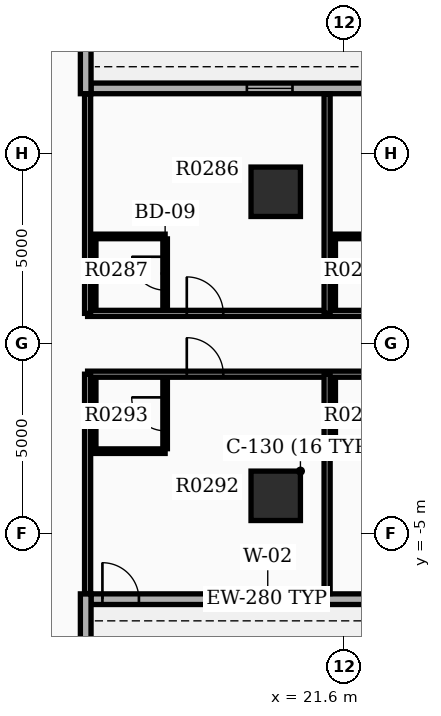
"""IFC4 building model, lengths in metres.
Left out: names, types, materials, properties, quantities, classifications, styles, units other than length and angle.
Written with IfcOpenShell. Run it as: python <this file> out.ifc"""

import sys

from ifc_helpers import new_model, si_unit, direction, frame, frame_2d, origin, origin_2d, place, context, subcontext, project, spatial, rectangle, extrude, element, fill, save


model = new_model("IFC4")
c1 = context("Model", 3, precision=1e-05, world=origin(), true_north=direction((0.0, 1.0)))
c2 = subcontext(c1, "Body", "Model", "MODEL_VIEW")
j1 = project(units=[si_unit("LENGTHUNIT", "METRE"), si_unit("PLANEANGLEUNIT", "RADIAN")], contexts=[c1])
p1 = place(None, origin())
s1 = spatial("IfcSite", under=j1, at=p1, CompositionType="ELEMENT")
p2 = place(p1, origin())
s2 = spatial("IfcBuilding", under=s1, at=p2, CompositionType="ELEMENT")
p3 = place(p2, frame((0.0, 0.0, 23.7)))
s3 = spatial("IfcBuildingStorey", under=s2, at=p3, CompositionType="ELEMENT", Elevation=23.7)
for number, where, z_axis, x_axis in (
    (1, (19.8, -4.0, 0.0), (0.0, 0.0, 1.0), (1.0, 0.0, 0.0)),
    (2, (19.8, 4.0, 0.0), (0.0, 0.0, 1.0), (1.0, 0.0, 0.0)),
):
    element("IfcColumn", number, at=place(p3, frame(where, z_axis=z_axis, x_axis=x_axis)), inside=s3, PredefinedType="COLUMN", context=c2, shape_type="SweptSolid", body=[
        extrude(rectangle(XDim=1.3, YDim=1.3, at=origin_2d()), origin(), (0.0, 0.0, 1.0), 3.9),
    ])
p4 = place(p3, frame((14.94, -6.72, 0.0), z_axis=(0.0, 0.0, 1.0), x_axis=(1.0, 0.0, 0.0)))
e3 = element("IfcWall", 3, at=p4, inside=s3, PredefinedType="STANDARD", context=c2, shape_type="SweptSolid", body=[
    extrude(rectangle(XDim=20.1, YDim=0.28, at=frame_2d((10.05, 0.0))), origin(), (0.0, 0.0, 1.0), 2.91),
])
p5 = place(p4, frame((4.05, 0.0, 0.8)))
e4 = element("IfcOpeningElement", 4, at=p5, cuts=e3, PredefinedType="OPENING", context=c2, shape_type="SweptSolid", body=[
    extrude(rectangle(XDim=1.2, YDim=1.6, at=frame_2d((0.6, 0.8))), frame((0.0, 0.15, 0.0), z_axis=(0.0, -1.0, 0.0), x_axis=(1.0, 0.0, 0.0)), (0.0, 0.0, 1.0), 0.3),
])
p6 = place(p4, frame((7.25, 0.0, 0.8)))
e5 = element("IfcOpeningElement", 5, at=p6, cuts=e3, PredefinedType="OPENING", context=c2, shape_type="SweptSolid", body=[
    extrude(rectangle(XDim=1.2, YDim=1.6, at=frame_2d((0.6, 0.8))), frame((0.0, 0.15, 0.0), z_axis=(0.0, -1.0, 0.0), x_axis=(1.0, 0.0, 0.0)), (0.0, 0.0, 1.0), 0.3),
])
p7 = place(p4, frame((10.45, 0.0, 0.8)))
e6 = element("IfcOpeningElement", 6, at=p7, cuts=e3, PredefinedType="OPENING", context=c2, shape_type="SweptSolid", body=[
    extrude(rectangle(XDim=1.2, YDim=1.6, at=frame_2d((0.6, 0.8))), frame((0.0, 0.15, 0.0), z_axis=(0.0, -1.0, 0.0), x_axis=(1.0, 0.0, 0.0)), (0.0, 0.0, 1.0), 0.3),
])
p8 = place(p4, frame((0.3, 0.0, 0.0)))
e7 = element("IfcOpeningElement", 7, at=p8, cuts=e3, PredefinedType="OPENING", context=c2, shape_type="SweptSolid", body=[
    extrude(rectangle(XDim=0.96, YDim=2.1, at=frame_2d((0.48, 1.05))), frame((0.0, 0.15, 0.0), z_axis=(0.0, -1.0, 0.0), x_axis=(1.0, 0.0, 0.0)), (0.0, 0.0, 1.0), 0.3),
])
p9 = place(p3, frame((35.04, 6.72, 0.0), z_axis=(0.0, 0.0, 1.0), x_axis=(-1.0, 0.0, 0.0)))
e8 = element("IfcWall", 8, at=p9, inside=s3, PredefinedType="STANDARD", context=c2, shape_type="SweptSolid", body=[
    extrude(rectangle(XDim=20.1, YDim=0.28, at=frame_2d((10.05, 0.0))), origin(), (0.0, 0.0, 1.0), 2.91),
])
p10 = place(p9, frame((4.05, 0.0, 0.8)))
e9 = element("IfcOpeningElement", 9, at=p10, cuts=e8, PredefinedType="OPENING", context=c2, shape_type="SweptSolid", body=[
    extrude(rectangle(XDim=1.2, YDim=1.6, at=frame_2d((0.6, 0.8))), frame((0.0, 0.15, 0.0), z_axis=(0.0, -1.0, 0.0), x_axis=(1.0, 0.0, 0.0)), (0.0, 0.0, 1.0), 0.3),
])
p11 = place(p9, frame((7.5, 0.0, 0.8)))
e10 = element("IfcOpeningElement", 10, at=p11, cuts=e8, PredefinedType="OPENING", context=c2, shape_type="SweptSolid", body=[
    extrude(rectangle(XDim=1.2, YDim=1.6, at=frame_2d((0.6, 0.8))), frame((0.0, 0.15, 0.0), z_axis=(0.0, -1.0, 0.0), x_axis=(1.0, 0.0, 0.0)), (0.0, 0.0, 1.0), 0.3),
])
p12 = place(p9, frame((10.7, 0.0, 0.8)))
e11 = element("IfcOpeningElement", 11, at=p12, cuts=e8, PredefinedType="OPENING", context=c2, shape_type="SweptSolid", body=[
    extrude(rectangle(XDim=1.2, YDim=1.6, at=frame_2d((0.6, 0.8))), frame((0.0, 0.15, 0.0), z_axis=(0.0, -1.0, 0.0), x_axis=(1.0, 0.0, 0.0)), (0.0, 0.0, 1.0), 0.3),
])
p13 = place(p9, frame((0.3, 0.0, 0.0)))
e12 = element("IfcOpeningElement", 12, at=p13, cuts=e8, PredefinedType="OPENING", context=c2, shape_type="SweptSolid", body=[
    extrude(rectangle(XDim=0.96, YDim=2.1, at=frame_2d((0.48, 1.05))), frame((0.0, 0.15, 0.0), z_axis=(0.0, -1.0, 0.0), x_axis=(1.0, 0.0, 0.0)), (0.0, 0.0, 1.0), 0.3),
])
p14 = place(p9, frame((14.799, 0.0, 0.85)))
e13 = element("IfcOpeningElement", 13, at=p14, cuts=e8, PredefinedType="OPENING", context=c2, shape_type="SweptSolid", body=[
    extrude(rectangle(XDim=1.2, YDim=1.6, at=frame_2d((0.6, 0.8))), frame((0.0, 0.15, 0.0), z_axis=(0.0, -1.0, 0.0), x_axis=(1.0, 0.0, 0.0)), (0.0, 0.0, 1.0), 0.3),
])
for number, where, z_axis, x_axis in (
    (14, (14.8, 6.58, 0.0), (0.0, 0.0, 1.0), (0.0, 1.0, 0.0)),
    (15, (14.8, -6.58, 0.0), (0.0, 0.0, 1.0), (0.0, -1.0, 0.0)),
):
    element("IfcWall", number, at=place(p3, frame(where, z_axis=z_axis, x_axis=x_axis)), inside=s3, PredefinedType="STANDARD", context=c2, shape_type="SweptSolid", body=[
        extrude(rectangle(XDim=6.86, YDim=0.28, at=frame_2d((3.43, 0.0))), origin(), (0.0, 0.0, 1.0), 2.91),
    ])
p15 = place(p3, frame((14.85, 0.8, 0.0), z_axis=(0.0, 0.0, 1.0), x_axis=(1.0, 0.0, 0.0)))
e16 = element("IfcWall", 16, at=p15, inside=s3, PredefinedType="PARTITIONING", context=c2, shape_type="SweptSolid", body=[
    extrude(rectangle(XDim=20.182, YDim=0.16, at=frame_2d((10.091, 0.0))), origin(), (0.0, 0.0, 1.0), 2.9),
])
p16 = place(p15, frame((2.61, 0.0, 0.0)))
e17 = element("IfcOpeningElement", 17, at=p16, cuts=e16, PredefinedType="OPENING", context=c2, shape_type="SweptSolid", body=[
    extrude(rectangle(XDim=0.96, YDim=2.15, at=frame_2d((0.48, 1.075))), frame((0.0, 0.09, 0.0), z_axis=(0.0, -1.0, 0.0), x_axis=(1.0, 0.0, 0.0)), (0.0, 0.0, 1.0), 0.18),
])
p17 = place(p15, frame((8.994, 0.0, 0.0)))
e18 = element("IfcOpeningElement", 18, at=p17, cuts=e16, PredefinedType="OPENING", context=c2, shape_type="SweptSolid", body=[
    extrude(rectangle(XDim=0.96, YDim=2.15, at=frame_2d((0.48, 1.075))), frame((0.0, 0.09, 0.0), z_axis=(0.0, -1.0, 0.0), x_axis=(1.0, 0.0, 0.0)), (0.0, 0.0, 1.0), 0.18),
])
p18 = place(p15, frame((18.93, 0.0, 0.0)))
e19 = element("IfcOpeningElement", 19, at=p18, cuts=e16, PredefinedType="OPENING", context=c2, shape_type="SweptSolid", body=[
    extrude(rectangle(XDim=0.96, YDim=2.15, at=frame_2d((0.48, 1.075))), frame((0.0, 0.09, 0.0), z_axis=(0.0, -1.0, 0.0), x_axis=(1.0, 0.0, 0.0)), (0.0, 0.0, 1.0), 0.18),
])
for number, where, z_axis, x_axis in (
    (20, (14.85, 0.8, 0.0), (0.0, 0.0, 1.0), (0.0, 1.0, 0.0)),
    (21, (21.152, 0.8, 0.0), (0.0, 0.0, 1.0), (0.0, 1.0, 0.0)),
):
    element("IfcWall", number, at=place(p3, frame(where, z_axis=z_axis, x_axis=x_axis)), inside=s3, PredefinedType="PARTITIONING", context=c2, shape_type="SweptSolid", body=[
        extrude(rectangle(XDim=5.772, YDim=0.16, at=frame_2d((2.886, 0.0))), origin(), (0.0, 0.0, 1.0), 2.9),
    ])
p19 = place(p3, frame((16.89, 0.94, 0.0), z_axis=(0.0, 0.0, 1.0), x_axis=(0.0, 1.0, 0.0)))
e22 = element("IfcWall", 22, at=p19, inside=s3, PredefinedType="PARTITIONING", context=c2, shape_type="SweptSolid", body=[
    extrude(rectangle(XDim=1.82, YDim=0.12, at=frame_2d((0.91, 0.0))), origin(), (0.0, 0.0, 1.0), 2.9),
])
p20 = place(p19, frame((0.47, 0.0, 0.0)))
e23 = element("IfcOpeningElement", 23, at=p20, cuts=e22, PredefinedType="OPENING", context=c2, shape_type="SweptSolid", body=[
    extrude(rectangle(XDim=0.88, YDim=2.1, at=frame_2d((0.44, 1.05))), frame((0.0, 0.07, 0.0), z_axis=(0.0, -1.0, 0.0), x_axis=(1.0, 0.0, 0.0)), (0.0, 0.0, 1.0), 0.14),
])
p21 = place(p3, frame((15.01, 0.94, 0.0), z_axis=(0.0, 0.0, 1.0), x_axis=(0.0, 1.0, 0.0)))
e24 = element("IfcWall", 24, at=p21, inside=s3, PredefinedType="PARTITIONING", context=c2, shape_type="SweptSolid", body=[
    extrude(rectangle(XDim=1.82, YDim=0.12, at=frame_2d((0.91, 0.0))), origin(), (0.0, 0.0, 1.0), 2.9),
])
p22 = place(p3, frame((15.01, 2.825, 0.0), z_axis=(0.0, 0.0, 1.0), x_axis=(1.0, 0.0, 0.0)))
e25 = element("IfcWall", 25, at=p22, inside=s3, PredefinedType="PARTITIONING", context=c2, shape_type="SweptSolid", body=[
    extrude(rectangle(XDim=1.88, YDim=0.12, at=frame_2d((0.94, 0.0))), origin(), (0.0, 0.0, 1.0), 2.9),
])
p23 = place(p3, frame((21.312, 0.94, 0.0), z_axis=(0.0, 0.0, 1.0), x_axis=(0.0, 1.0, 0.0)))
e26 = element("IfcWall", 26, at=p23, inside=s3, PredefinedType="PARTITIONING", context=c2, shape_type="SweptSolid", body=[
    extrude(rectangle(XDim=1.82, YDim=0.12, at=frame_2d((0.91, 0.0))), origin(), (0.0, 0.0, 1.0), 2.9),
])
p24 = place(p3, frame((21.312, 2.825, 0.0), z_axis=(0.0, 0.0, 1.0), x_axis=(1.0, 0.0, 0.0)))
e27 = element("IfcWall", 27, at=p24, inside=s3, PredefinedType="PARTITIONING", context=c2, shape_type="SweptSolid", body=[
    extrude(rectangle(XDim=1.88, YDim=0.12, at=frame_2d((0.94, 0.0))), origin(), (0.0, 0.0, 1.0), 2.9),
])
p25 = place(p3, frame((14.85, -0.8, 0.0), z_axis=(0.0, 0.0, 1.0), x_axis=(1.0, 0.0, 0.0)))
e28 = element("IfcWall", 28, at=p25, inside=s3, PredefinedType="PARTITIONING", context=c2, shape_type="SweptSolid", body=[
    extrude(rectangle(XDim=20.182, YDim=0.16, at=frame_2d((10.091, 0.0))), origin(), (0.0, 0.0, 1.0), 2.9),
])
p26 = place(p25, frame((2.61, 0.0, 0.0)))
e29 = element("IfcOpeningElement", 29, at=p26, cuts=e28, PredefinedType="OPENING", context=c2, shape_type="SweptSolid", body=[
    extrude(rectangle(XDim=0.96, YDim=2.15, at=frame_2d((0.48, 1.075))), frame((0.0, 0.09, 0.0), z_axis=(0.0, -1.0, 0.0), x_axis=(1.0, 0.0, 0.0)), (0.0, 0.0, 1.0), 0.18),
])
p27 = place(p25, frame((8.994, 0.0, 0.0)))
e30 = element("IfcOpeningElement", 30, at=p27, cuts=e28, PredefinedType="OPENING", context=c2, shape_type="SweptSolid", body=[
    extrude(rectangle(XDim=0.96, YDim=2.15, at=frame_2d((0.48, 1.075))), frame((0.0, 0.09, 0.0), z_axis=(0.0, -1.0, 0.0), x_axis=(1.0, 0.0, 0.0)), (0.0, 0.0, 1.0), 0.18),
])
p28 = place(p25, frame((18.93, 0.0, 0.0)))
e31 = element("IfcOpeningElement", 31, at=p28, cuts=e28, PredefinedType="OPENING", context=c2, shape_type="SweptSolid", body=[
    extrude(rectangle(XDim=0.96, YDim=2.15, at=frame_2d((0.48, 1.075))), frame((0.0, 0.09, 0.0), z_axis=(0.0, -1.0, 0.0), x_axis=(1.0, 0.0, 0.0)), (0.0, 0.0, 1.0), 0.18),
])
for number, where, z_axis, x_axis in (
    (32, (14.85, -0.8, 0.0), (0.0, 0.0, 1.0), (0.0, -1.0, 0.0)),
    (33, (21.152, -0.8, 0.0), (0.0, 0.0, 1.0), (0.0, -1.0, 0.0)),
):
    element("IfcWall", number, at=place(p3, frame(where, z_axis=z_axis, x_axis=x_axis)), inside=s3, PredefinedType="PARTITIONING", context=c2, shape_type="SweptSolid", body=[
        extrude(rectangle(XDim=5.772, YDim=0.16, at=frame_2d((2.886, 0.0))), origin(), (0.0, 0.0, 1.0), 2.9),
    ])
p29 = place(p3, frame((16.89, -2.76, 0.0), z_axis=(0.0, 0.0, 1.0), x_axis=(0.0, 1.0, 0.0)))
e34 = element("IfcWall", 34, at=p29, inside=s3, PredefinedType="PARTITIONING", context=c2, shape_type="SweptSolid", body=[
    extrude(rectangle(XDim=1.82, YDim=0.12, at=frame_2d((0.91, 0.0))), origin(), (0.0, 0.0, 1.0), 2.9),
])
p30 = place(p29, frame((0.47, 0.0, 0.0)))
e35 = element("IfcOpeningElement", 35, at=p30, cuts=e34, PredefinedType="OPENING", context=c2, shape_type="SweptSolid", body=[
    extrude(rectangle(XDim=0.88, YDim=2.1, at=frame_2d((0.44, 1.05))), frame((0.0, 0.07, 0.0), z_axis=(0.0, -1.0, 0.0), x_axis=(1.0, 0.0, 0.0)), (0.0, 0.0, 1.0), 0.14),
])
p31 = place(p3, frame((15.01, -2.76, 0.0), z_axis=(0.0, 0.0, 1.0), x_axis=(0.0, 1.0, 0.0)))
e36 = element("IfcWall", 36, at=p31, inside=s3, PredefinedType="PARTITIONING", context=c2, shape_type="SweptSolid", body=[
    extrude(rectangle(XDim=1.82, YDim=0.12, at=frame_2d((0.91, 0.0))), origin(), (0.0, 0.0, 1.0), 2.9),
])
p32 = place(p3, frame((15.01, -2.825, 0.0), z_axis=(0.0, 0.0, 1.0), x_axis=(1.0, 0.0, 0.0)))
e37 = element("IfcWall", 37, at=p32, inside=s3, PredefinedType="PARTITIONING", context=c2, shape_type="SweptSolid", body=[
    extrude(rectangle(XDim=1.88, YDim=0.12, at=frame_2d((0.94, 0.0))), origin(), (0.0, 0.0, 1.0), 2.9),
])
p33 = place(p3, frame((21.312, -2.76, 0.0), z_axis=(0.0, 0.0, 1.0), x_axis=(0.0, 1.0, 0.0)))
e38 = element("IfcWall", 38, at=p33, inside=s3, PredefinedType="PARTITIONING", context=c2, shape_type="SweptSolid", body=[
    extrude(rectangle(XDim=1.82, YDim=0.12, at=frame_2d((0.91, 0.0))), origin(), (0.0, 0.0, 1.0), 2.9),
])
p34 = place(p3, frame((21.312, -2.825, 0.0), z_axis=(0.0, 0.0, 1.0), x_axis=(1.0, 0.0, 0.0)))
e39 = element("IfcWall", 39, at=p34, inside=s3, PredefinedType="PARTITIONING", context=c2, shape_type="SweptSolid", body=[
    extrude(rectangle(XDim=1.88, YDim=0.12, at=frame_2d((0.94, 0.0))), origin(), (0.0, 0.0, 1.0), 2.9),
])
p35 = place(p5, origin())
e40 = element("IfcWindow", 40, at=p35, inside=s3, PartitioningType="SINGLE_PANEL", PredefinedType="WINDOW", context=c2, shape_type="SweptSolid", body=[
    extrude(rectangle(XDim=1.2, YDim=1.6, at=frame_2d((0.6, 0.8))), frame((0.0, 0.03, 0.0), z_axis=(0.0, -1.0, 0.0), x_axis=(1.0, 0.0, 0.0)), (0.0, 0.0, 1.0), 0.06),
])
fill(e4, e40)
p36 = place(p8, origin())
e41 = element("IfcDoor", 41, at=p36, inside=s3, OperationType="SINGLE_SWING_LEFT", PredefinedType="DOOR", context=c2, shape_type="SweptSolid", body=[
    extrude(rectangle(XDim=0.96, YDim=2.1, at=frame_2d((0.48, 1.05))), frame((0.0, 0.025, 0.0), z_axis=(0.0, -1.0, 0.0), x_axis=(1.0, 0.0, 0.0)), (0.0, 0.0, 1.0), 0.05),
])
fill(e7, e41)
p37 = place(p14, origin())
e42 = element("IfcWindow", 42, at=p37, inside=s3, PartitioningType="SINGLE_PANEL", PredefinedType="WINDOW", context=c2, shape_type="SweptSolid", body=[
    extrude(rectangle(XDim=1.2, YDim=1.6, at=frame_2d((0.6, 0.8))), frame((0.0, 0.03, 0.0), z_axis=(0.0, -1.0, 0.0), x_axis=(1.0, 0.0, 0.0)), (0.0, 0.0, 1.0), 0.06),
])
fill(e13, e42)
p38 = place(p16, origin())
e43 = element("IfcDoor", 43, at=p38, inside=s3, OperationType="SINGLE_SWING_LEFT", PredefinedType="DOOR", context=c2, shape_type="SweptSolid", body=[
    extrude(rectangle(XDim=0.96, YDim=2.15, at=frame_2d((0.48, 1.075))), frame((0.0, 0.025, 0.0), z_axis=(0.0, -1.0, 0.0), x_axis=(1.0, 0.0, 0.0)), (0.0, 0.0, 1.0), 0.05),
])
fill(e17, e43)
p39 = place(p20, origin())
e44 = element("IfcDoor", 44, at=p39, inside=s3, OperationType="SINGLE_SWING_RIGHT", PredefinedType="DOOR", context=c2, shape_type="SweptSolid", body=[
    extrude(rectangle(XDim=0.88, YDim=2.1, at=frame_2d((0.44, 1.05))), frame((0.0, 0.025, 0.0), z_axis=(0.0, -1.0, 0.0), x_axis=(1.0, 0.0, 0.0)), (0.0, 0.0, 1.0), 0.05),
])
fill(e23, e44)
p40 = place(p26, origin())
e45 = element("IfcDoor", 45, at=p40, inside=s3, OperationType="SINGLE_SWING_LEFT", PredefinedType="DOOR", context=c2, shape_type="SweptSolid", body=[
    extrude(rectangle(XDim=0.96, YDim=2.15, at=frame_2d((0.48, 1.075))), frame((0.0, 0.025, 0.0), z_axis=(0.0, -1.0, 0.0), x_axis=(1.0, 0.0, 0.0)), (0.0, 0.0, 1.0), 0.05),
])
fill(e29, e45)
p41 = place(p30, origin())
e46 = element("IfcDoor", 46, at=p41, inside=s3, OperationType="SINGLE_SWING_RIGHT", PredefinedType="DOOR", context=c2, shape_type="SweptSolid", body=[
    extrude(rectangle(XDim=0.88, YDim=2.1, at=frame_2d((0.44, 1.05))), frame((0.0, 0.025, 0.0), z_axis=(0.0, -1.0, 0.0), x_axis=(1.0, 0.0, 0.0)), (0.0, 0.0, 1.0), 0.05),
])
fill(e35, e46)
save(model, sys.argv[1])
